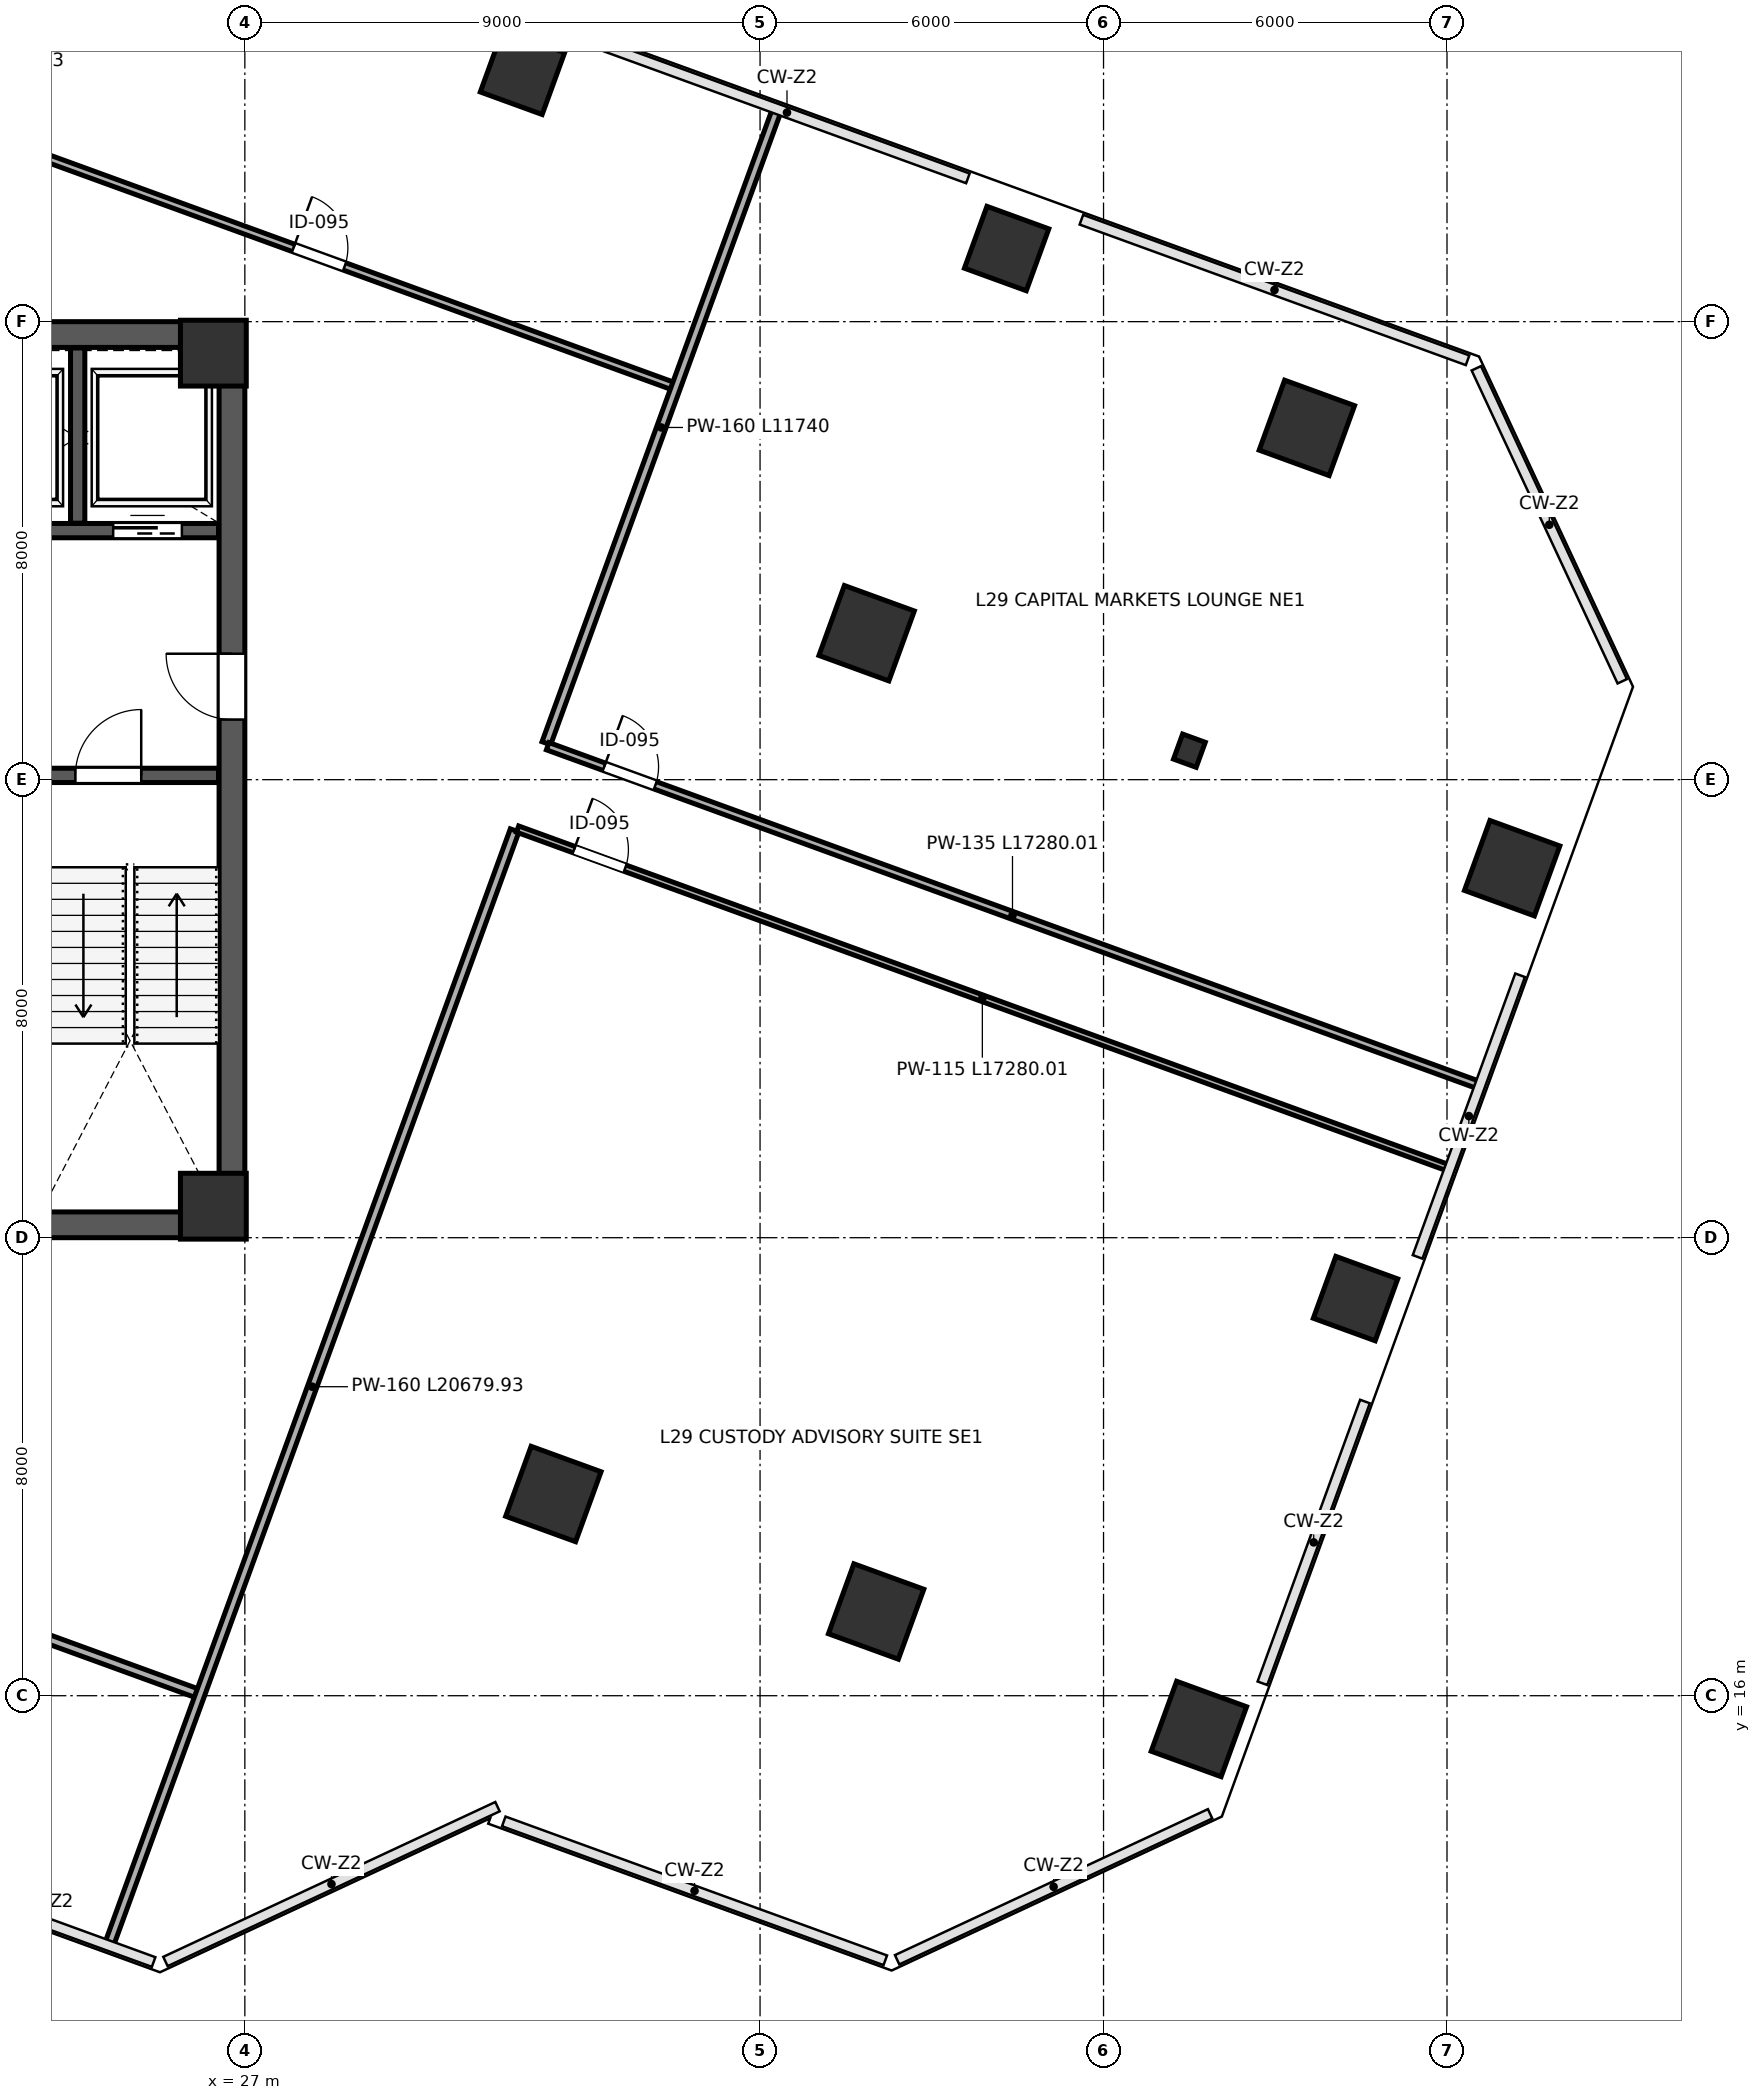
"""IFC4 building model, lengths in metres.
Left out: names, types, materials, properties, quantities, classifications, styles, units other than length and angle.
Written with IfcOpenShell. Run it as: python <this file> out.ifc"""

import sys

from ifc_helpers import new_model, si_unit, direction, frame, frame_2d, origin, origin_2d, place, context, subcontext, project, spatial, rectangle, i_section, extrude, clip, halfspace, source, transform, mapped, element, fill, save


model = new_model("IFC4")
c1 = context("Model", 3, precision=1e-05, world=origin(), true_north=direction((0.0, 1.0)))
c2 = subcontext(c1, "Body", "Model", "MODEL_VIEW")
j1 = project(units=[si_unit("LENGTHUNIT", "METRE"), si_unit("PLANEANGLEUNIT", "RADIAN")], contexts=[c1])
p1 = place(None, origin())
s1 = spatial("IfcSite", under=j1, at=p1, CompositionType="ELEMENT")
p2 = place(p1, origin())
s2 = spatial("IfcBuilding", under=s1, at=p2, CompositionType="ELEMENT")
p3 = place(p2, frame((0.0, 0.0, 133.0)))
s3 = spatial("IfcBuildingStorey", under=s2, at=p3, CompositionType="ELEMENT", Elevation=133.0)
m1 = source(origin(), c2, "Body", "SweptSolid", [
    extrude(rectangle(XDim=1.15, YDim=1.15, at=origin_2d()), origin(), (0.0, 0.0, 1.0), 4.198),
])
for number, where, z_axis, x_axis in (
    (1, (26.45, 24.55, 0.001), (0.0, 0.0, 1.0), (1.0, 0.0, 0.0)),
    (2, (26.45, 39.45, 0.001), (0.0, 0.0, 1.0), (1.0, 0.0, 0.0)),
):
    element("IfcColumn", number, at=place(p3, frame(where, z_axis=z_axis, x_axis=x_axis)), inside=s3, PredefinedType="COLUMN", context=c2, shape_type="MappedRepresentation", body=[
        mapped(m1, transform((0.0, 0.0, 0.0), scale=1.0)),
    ])
p4 = place(p3, frame((31.85, 44.355, 0.0), z_axis=(0.063371803059, -0.054277312126, 0.996512914099), x_axis=(-0.87013419842, -0.491987882004, 0.028537706658)))
e3 = element("IfcColumn", 3, at=p4, inside=s3, PredefinedType="COLUMN", context=c2, shape_type="Clipping", body=[
    clip(clip(extrude(rectangle(XDim=1.15, YDim=1.15, at=origin_2d()), origin(), (0.0, 0.0, 1.0), 4.215), halfspace(frame((0.0, 0.0, 0.062), z_axis=(0.0, 0.0, -1.0), x_axis=(1.0, 0.0, 0.0)), False)), halfspace(frame((0.0, 0.0, 4.152), z_axis=(0.0, 0.0, 1.0), x_axis=(1.0, 0.0, 0.0)), False)),
])
p5 = place(p3, frame((32.389, 19.523, 0.0), z_axis=(-0.0652127021, -0.055656666713, 0.996318041057), x_axis=(-0.35083091128, 0.935979616649, 0.029322839359)))
e4 = element("IfcColumn", 4, at=p5, inside=s3, PredefinedType="COLUMN", context=c2, shape_type="Clipping", body=[
    clip(clip(extrude(rectangle(XDim=1.3, YDim=1.3, at=origin_2d()), origin(), (0.0, 0.0, 1.0), 4.216), halfspace(frame((0.0, 0.0, 0.073), z_axis=(0.0, 0.0, -1.0), x_axis=(1.0, 0.0, 0.0)), False)), halfspace(frame((0.0, 0.0, 4.143), z_axis=(0.0, 0.0, 1.0), x_axis=(1.0, 0.0, 0.0)), False)),
])
p6 = place(p3, frame((37.862, 34.558, 0.0), z_axis=(0.012278122597, -0.084788544725, 0.996323316193), x_axis=(-0.978828468679, 0.202574010185, 0.029301865156)))
e5 = element("IfcColumn", 5, at=p6, inside=s3, PredefinedType="COLUMN", context=c2, shape_type="Clipping", body=[
    clip(clip(extrude(rectangle(XDim=1.3, YDim=1.3, at=origin_2d()), origin(), (0.0, 0.0, 1.0), 4.215), halfspace(frame((0.0, 0.0, 0.073), z_axis=(0.0, 0.0, -1.0), x_axis=(1.0, 0.0, 0.0)), False)), halfspace(frame((0.0, 0.0, 4.143), z_axis=(0.0, 0.0, 1.0), x_axis=(1.0, 0.0, 0.0)), False)),
])
p7 = place(p3, frame((40.307, 41.277, 0.0), z_axis=(0.046865537006, -0.09766061349, 0.994115700517), x_axis=(-0.994296038519, -0.100013866922, 0.037048808472)))
e6 = element("IfcColumn", 6, at=p7, inside=s3, PredefinedType="COLUMN", context=c2, shape_type="Clipping", body=[
    clip(clip(extrude(rectangle(XDim=1.15, YDim=1.15, at=origin_2d()), origin(), (0.0, 0.0, 1.0), 4.225), halfspace(frame((0.0, 0.0, 0.081), z_axis=(0.0, 0.0, -1.0), x_axis=(1.0, 0.0, 0.0)), False)), halfspace(frame((0.0, 0.0, 4.144), z_axis=(0.0, 0.0, 1.0), x_axis=(1.0, 0.0, 0.0)), False)),
])
p8 = place(p3, frame((38.028, 17.471, 0.0), z_axis=(-0.075888208502, -0.084435738836, 0.993534894112), x_axis=(-0.47174748667, 0.8808783405, 0.03882857271)))
e7 = element("IfcColumn", 7, at=p8, inside=s3, PredefinedType="COLUMN", context=c2, shape_type="Clipping", body=[
    clip(clip(extrude(rectangle(XDim=1.3, YDim=1.3, at=origin_2d()), origin(), (0.0, 0.0, 1.0), 4.227), halfspace(frame((0.0, 0.0, 0.096), z_axis=(0.0, 0.0, -1.0), x_axis=(1.0, 0.0, 0.0)), False)), halfspace(frame((0.0, 0.0, 4.131), z_axis=(0.0, 0.0, 1.0), x_axis=(1.0, 0.0, 0.0)), False)),
])
p9 = place(p3, frame((43.5, 32.506, 0.0), z_axis=(0.001328328773, -0.113543233339, 0.99353216843), x_axis=(-0.943603423931, 0.328792163415, 0.038836730339)))
e8 = element("IfcColumn", 8, at=p9, inside=s3, PredefinedType="COLUMN", context=c2, shape_type="Clipping", body=[
    clip(clip(extrude(i_section(OverallWidth=0.421, OverallDepth=0.465, WebThickness=0.045, FlangeThickness=0.072, FilletRadius=0.015, at=origin_2d()), origin(), (0.0, 0.0, 1.0), 4.227), halfspace(frame((0.0, 0.0, 0.034), z_axis=(0.0, 0.0, -1.0), x_axis=(1.0, 0.0, 0.0)), False)), halfspace(frame((0.0, 0.0, 4.193), z_axis=(0.0, 0.0, 1.0), x_axis=(1.0, 0.0, 0.0)), False)),
])
p10 = place(p3, frame((45.552, 38.144, 0.0), z_axis=(0.030324992109, -0.124240224324, 0.991788667768), x_axis=(-0.993327056071, 0.106715323233, 0.043740135619)))
e9 = element("IfcColumn", 9, at=p10, inside=s3, PredefinedType="COLUMN", context=c2, shape_type="Clipping", body=[
    clip(clip(extrude(rectangle(XDim=1.3, YDim=1.3, at=origin_2d()), origin(), (0.0, 0.0, 1.0), 4.235), halfspace(frame((0.0, 0.0, 0.108), z_axis=(0.0, 0.0, -1.0), x_axis=(1.0, 0.0, 0.0)), False)), halfspace(frame((0.0, 0.0, 4.126), z_axis=(0.0, 0.0, 1.0), x_axis=(1.0, 0.0, 0.0)), False)),
])
p11 = place(p3, frame((43.666, 15.419, 0.0), z_axis=(-0.086535954918, -0.113060605994, 0.989812521581), x_axis=(-0.540443813181, 0.83996976619, 0.048695756295)))
e10 = element("IfcColumn", 10, at=p11, inside=s3, PredefinedType="COLUMN", context=c2, shape_type="Clipping", body=[
    clip(clip(extrude(rectangle(XDim=1.3, YDim=1.3, at=origin_2d()), origin(), (0.0, 0.0, 1.0), 4.243), halfspace(frame((0.0, 0.0, 0.121), z_axis=(0.0, 0.0, -1.0), x_axis=(1.0, 0.0, 0.0)), False)), halfspace(frame((0.0, 0.0, 4.123), z_axis=(0.0, 0.0, 1.0), x_axis=(1.0, 0.0, 0.0)), False)),
])
p12 = place(p3, frame((46.402, 22.937, 0.0), z_axis=(-0.048027148389, -0.127611703632, 0.990660711906), x_axis=(-0.760123550195, 0.64810293408, 0.046634485907)))
e11 = element("IfcColumn", 11, at=p12, inside=s3, PredefinedType="COLUMN", context=c2, shape_type="Clipping", body=[
    clip(clip(extrude(rectangle(XDim=1.15, YDim=1.15, at=origin_2d()), origin(), (0.0, 0.0, 1.0), 4.24), halfspace(frame((0.0, 0.0, 0.102), z_axis=(0.0, 0.0, -1.0), x_axis=(1.0, 0.0, 0.0)), False)), halfspace(frame((0.0, 0.0, 4.137), z_axis=(0.0, 0.0, 1.0), x_axis=(1.0, 0.0, 0.0)), False)),
])
p13 = place(p3, frame((49.138, 30.454, 0.0), z_axis=(-0.009493717119, -0.142002993027, 0.989820700585), x_axis=(-0.915016724924, 0.400468488729, 0.048676304747)))
e12 = element("IfcColumn", 12, at=p13, inside=s3, PredefinedType="COLUMN", context=c2, shape_type="Clipping", body=[
    clip(clip(extrude(rectangle(XDim=1.3, YDim=1.3, at=origin_2d()), origin(), (0.0, 0.0, 1.0), 4.243), halfspace(frame((0.0, 0.0, 0.121), z_axis=(0.0, 0.0, -1.0), x_axis=(1.0, 0.0, 0.0)), False)), halfspace(frame((0.0, 0.0, 4.123), z_axis=(0.0, 0.0, 1.0), x_axis=(1.0, 0.0, 0.0)), False)),
])
p14 = place(p3, frame((26.775, 24.45, 0.0), z_axis=(0.0, 0.0, 1.0), x_axis=(0.0, 1.0, 0.0)))
e13 = element("IfcWall", 13, at=p14, inside=s3, PredefinedType="SHEAR", context=c2, shape_type="SweptSolid", body=[
    extrude(rectangle(XDim=15.1, YDim=0.45, at=frame_2d((7.55, 0.0))), origin(), (0.0, 0.0, 1.0), 3.96),
])
p15 = place(p14, frame((8.6, 0.0, 0.0)))
e14 = element("IfcOpeningElement", 14, at=p15, cuts=e13, PredefinedType="OPENING", context=c2, shape_type="SweptSolid", body=[
    extrude(rectangle(XDim=1.15, YDim=2.2, at=frame_2d((0.575, 1.1))), frame((0.0, 0.235, 0.0), z_axis=(0.0, -1.0, 0.0), x_axis=(1.0, 0.0, 0.0)), (0.0, 0.0, 1.0), 0.47),
])
for number, where, z_axis, x_axis in (
    (15, (9.0, 24.225, 0.0), (0.0, 0.0, 1.0), (1.0, 0.0, 0.0)),
    (16, (9.0, 39.775, 0.0), (0.0, 0.0, 1.0), (1.0, 0.0, 0.0)),
):
    element("IfcWall", number, at=place(p3, frame(where, z_axis=z_axis, x_axis=x_axis)), inside=s3, PredefinedType="SHEAR", context=c2, shape_type="SweptSolid", body=[
        extrude(rectangle(XDim=18.0, YDim=0.45, at=frame_2d((9.0, 0.0))), origin(), (0.0, 0.0, 1.0), 3.96),
    ])
p16 = place(p3, frame((23.19, 32.075, 0.0), z_axis=(0.0, 0.0, 1.0), x_axis=(1.0, 0.0, 0.0)))
e17 = element("IfcWall", 17, at=p16, inside=s3, PredefinedType="SHEAR", context=c2, shape_type="SweptSolid", body=[
    extrude(rectangle(XDim=3.35, YDim=0.25, at=frame_2d((1.675, 0.0))), origin(), (0.0, 0.0, 1.0), 3.96),
])
p17 = place(p16, frame((0.85, 0.0, 0.0)))
e18 = element("IfcOpeningElement", 18, at=p17, cuts=e17, PredefinedType="OPENING", context=c2, shape_type="SweptSolid", body=[
    extrude(rectangle(XDim=1.15, YDim=2.2, at=frame_2d((0.575, 1.1))), frame((0.0, 0.135, 0.0), z_axis=(0.0, -1.0, 0.0), x_axis=(1.0, 0.0, 0.0)), (0.0, 0.0, 1.0), 0.27),
])
p18 = place(p3, frame((21.45, 36.35, 0.0), z_axis=(0.0, 0.0, 1.0), x_axis=(1.0, 0.0, 0.0)))
e19 = element("IfcWall", 19, at=p18, inside=s3, PredefinedType="SHEAR", context=c2, shape_type="SweptSolid", body=[
    extrude(rectangle(XDim=5.09, YDim=0.25, at=frame_2d((2.545, 0.0))), origin(), (0.0, 0.0, 1.0), 3.96),
])
p19 = place(p18, frame((0.7, 0.0, 0.0)))
e20 = element("IfcOpeningElement", 20, at=p19, cuts=e19, PredefinedType="OPENING", context=c2, shape_type="SweptSolid", body=[
    extrude(rectangle(XDim=1.2, YDim=2.2, at=frame_2d((0.6, 1.1))), frame((0.0, 0.135, 0.0), z_axis=(0.0, -1.0, 0.0), x_axis=(1.0, 0.0, 0.0)), (0.0, 0.0, 1.0), 0.27),
])
p20 = place(p18, frame((3.25, 0.0, 0.0)))
e21 = element("IfcOpeningElement", 21, at=p20, cuts=e19, PredefinedType="OPENING", context=c2, shape_type="SweptSolid", body=[
    extrude(rectangle(XDim=1.2, YDim=2.2, at=frame_2d((0.6, 1.1))), frame((0.0, 0.135, 0.0), z_axis=(0.0, -1.0, 0.0), x_axis=(1.0, 0.0, 0.0)), (0.0, 0.0, 1.0), 0.27),
])
p21 = place(p3, frame((24.08, 36.48, 0.0), z_axis=(0.0, 0.0, 1.0), x_axis=(0.0, 1.0, 0.0)))
e22 = element("IfcWall", 22, at=p21, inside=s3, PredefinedType="SHEAR", context=c2, shape_type="SweptSolid", body=[
    extrude(rectangle(XDim=3.06, YDim=0.25, at=frame_2d((1.53, 0.0))), origin(), (0.0, 0.0, 1.0), 3.96),
])
p22 = place(p3, frame((8.168, 22.592, 0.0), z_axis=(0.0, 0.0, 1.0), x_axis=(0.939694846349, -0.342014028579, 0.0)))
e23 = element("IfcWall", 23, at=p22, inside=s3, PredefinedType="PARTITIONING", context=c2, shape_type="SweptSolid", body=[
    extrude(rectangle(XDim=19.17, YDim=0.16, at=frame_2d((9.585, 0.0))), origin(), (0.0, 0.0, 1.0), 3.96),
])
p23 = place(p22, frame((1.45, 0.0, 0.0)))
e24 = element("IfcOpeningElement", 24, at=p23, cuts=e23, PredefinedType="OPENING", context=c2, shape_type="SweptSolid", body=[
    extrude(rectangle(XDim=0.95, YDim=2.15, at=frame_2d((0.475, 1.075))), frame((0.0, 0.09, 0.0), z_axis=(0.0, -1.0, 0.0), x_axis=(1.0, 0.0, 0.0)), (0.0, 0.0, 1.0), 0.18),
])
p24 = place(p3, frame((10.184, 47.719, 0.0), z_axis=(0.0, 0.0, 1.0), x_axis=(0.939691432235, -0.342023408826, 0.0)))
e25 = element("IfcWall", 25, at=p24, inside=s3, PredefinedType="PARTITIONING", context=c2, shape_type="SweptSolid", body=[
    extrude(rectangle(XDim=25.87, YDim=0.135, at=frame_2d((12.935, 0.0))), origin(), (0.0, 0.0, 1.0), 3.96),
])
p25 = place(p24, frame((18.8, 0.0, 0.0)))
e26 = element("IfcOpeningElement", 26, at=p25, cuts=e25, PredefinedType="OPENING", context=c2, shape_type="SweptSolid", body=[
    extrude(rectangle(XDim=0.95, YDim=2.15, at=frame_2d((0.475, 1.075))), frame((0.0, 0.078, 0.0), z_axis=(0.0, -1.0, 0.0), x_axis=(1.0, 0.0, 0.0)), (0.0, 0.0, 1.0), 0.155),
])
p26 = place(p3, frame((32.267, 32.636, 0.0), z_axis=(0.0, 0.0, 1.0), x_axis=(0.34200686721, 0.939697452791, 0.0)))
e27 = element("IfcWall", 27, at=p26, inside=s3, PredefinedType="PARTITIONING", context=c2, shape_type="SweptSolid", body=[
    extrude(rectangle(XDim=11.74, YDim=0.16, at=frame_2d((5.87, 0.0))), origin(), (0.0, 0.0, 1.0), 3.195),
])
p27 = place(p3, frame((24.64, 11.681, 0.0), z_axis=(0.0, 0.0, 1.0), x_axis=(0.342014151498, 0.939694801611, 0.0)))
e28 = element("IfcWall", 28, at=p27, inside=s3, PredefinedType="PARTITIONING", context=c2, shape_type="SweptSolid", body=[
    extrude(rectangle(XDim=20.68, YDim=0.16, at=frame_2d((10.34, 0.0))), origin(), (0.0, 0.0, 1.0), 3.96),
])
p28 = place(p3, frame((32.291, 32.585, 0.0), z_axis=(0.0, 0.0, 1.0), x_axis=(0.939691078169, -0.342024381601, 0.0)))
e29 = element("IfcWall", 29, at=p28, inside=s3, PredefinedType="PARTITIONING", context=c2, shape_type="SweptSolid", body=[
    extrude(rectangle(XDim=17.28, YDim=0.135, at=frame_2d((8.64, 0.0))), origin(), (0.0, 0.0, 1.0), 3.96),
])
p29 = place(p28, frame((1.05, 0.0, 0.0)))
e30 = element("IfcOpeningElement", 30, at=p29, cuts=e29, PredefinedType="OPENING", context=c2, shape_type="SweptSolid", body=[
    extrude(rectangle(XDim=0.95, YDim=2.15, at=frame_2d((0.475, 1.075))), frame((0.0, 0.078, 0.0), z_axis=(0.0, -1.0, 0.0), x_axis=(1.0, 0.0, 0.0)), (0.0, 0.0, 1.0), 0.155),
])
p30 = place(p3, frame((31.764, 31.137, 0.0), z_axis=(0.0, 0.0, 1.0), x_axis=(0.939692730905, -0.342019840775, 0.0)))
e31 = element("IfcWall", 31, at=p30, inside=s3, PredefinedType="PARTITIONING", context=c2, shape_type="SweptSolid", body=[
    extrude(rectangle(XDim=17.28, YDim=0.115, at=frame_2d((8.64, 0.0))), origin(), (0.0, 0.0, 1.0), 3.96),
])
p31 = place(p30, frame((1.05, 0.0, 0.0)))
e32 = element("IfcOpeningElement", 32, at=p31, cuts=e31, PredefinedType="OPENING", context=c2, shape_type="SweptSolid", body=[
    extrude(rectangle(XDim=0.95, YDim=2.15, at=frame_2d((0.475, 1.075))), frame((0.0, 0.067, 0.0), z_axis=(0.0, -1.0, 0.0), x_axis=(1.0, 0.0, 0.0)), (0.0, 0.0, 1.0), 0.135),
])
m2 = source(origin(), c2, "Body", "SweptSolid", [
    extrude(rectangle(XDim=1.15, YDim=2.2, at=frame_2d((0.575, 1.1))), frame((0.0, 0.025, 0.0), z_axis=(0.0, -1.0, 0.0), x_axis=(1.0, 0.0, 0.0)), (0.0, 0.0, 1.0), 0.05),
])
p32 = place(p17, origin())
e33 = element("IfcDoor", 33, at=p32, inside=s3, OperationType="SINGLE_SWING_RIGHT", PredefinedType="DOOR", context=c2, shape_type="MappedRepresentation", body=[
    mapped(m2, transform((0.0, 0.0, 0.0), scale=1.0)),
])
fill(e18, e33)
m3 = source(origin(), c2, "Body", "SweptSolid", [
    extrude(rectangle(XDim=1.15, YDim=2.2, at=frame_2d((0.575, 1.1))), frame((0.0, 0.025, 0.0), z_axis=(0.0, -1.0, 0.0), x_axis=(1.0, 0.0, 0.0)), (0.0, 0.0, 1.0), 0.05),
])
p33 = place(p15, origin())
e34 = element("IfcDoor", 34, at=p33, inside=s3, OperationType="SINGLE_SWING_RIGHT", PredefinedType="DOOR", context=c2, shape_type="MappedRepresentation", body=[
    mapped(m3, transform((0.0, 0.0, 0.0), scale=1.0)),
])
fill(e14, e34)
m4 = source(origin(), c2, "Body", "SweptSolid", [
    extrude(rectangle(XDim=1.2, YDim=2.2, at=frame_2d((0.6, 1.1))), frame((0.0, 0.025, 0.0), z_axis=(0.0, -1.0, 0.0), x_axis=(1.0, 0.0, 0.0)), (0.0, 0.0, 1.0), 0.05),
])
p34 = place(p20, origin())
e35 = element("IfcDoor", 35, at=p34, inside=s3, OperationType="SLIDING_TO_RIGHT", PredefinedType="DOOR", context=c2, shape_type="MappedRepresentation", body=[
    mapped(m4, transform((0.0, 0.0, 0.0), scale=1.0)),
])
fill(e21, e35)
m5 = source(origin(), c2, "Body", "SweptSolid", [
    extrude(rectangle(XDim=0.95, YDim=2.15, at=frame_2d((0.475, 1.075))), frame((0.0, 0.025, 0.0), z_axis=(0.0, -1.0, 0.0), x_axis=(1.0, 0.0, 0.0)), (0.0, 0.0, 1.0), 0.05),
])
p35 = place(p25, origin())
e36 = element("IfcDoor", 36, at=p35, inside=s3, OperationType="SINGLE_SWING_LEFT", PredefinedType="DOOR", context=c2, shape_type="MappedRepresentation", body=[
    mapped(m5, transform((0.0, 0.0, 0.0), scale=1.0)),
])
fill(e26, e36)
p36 = place(p29, origin())
e37 = element("IfcDoor", 37, at=p36, inside=s3, OperationType="SINGLE_SWING_LEFT", PredefinedType="DOOR", context=c2, shape_type="MappedRepresentation", body=[
    mapped(m5, transform((0.0, 0.0, 0.0), scale=1.0)),
])
fill(e30, e37)
p37 = place(p31, origin())
e38 = element("IfcDoor", 38, at=p37, inside=s3, OperationType="SINGLE_SWING_LEFT", PredefinedType="DOOR", context=c2, shape_type="MappedRepresentation", body=[
    mapped(m5, transform((0.0, 0.0, 0.0), scale=1.0)),
])
fill(e32, e38)
save(model, sys.argv[1])
